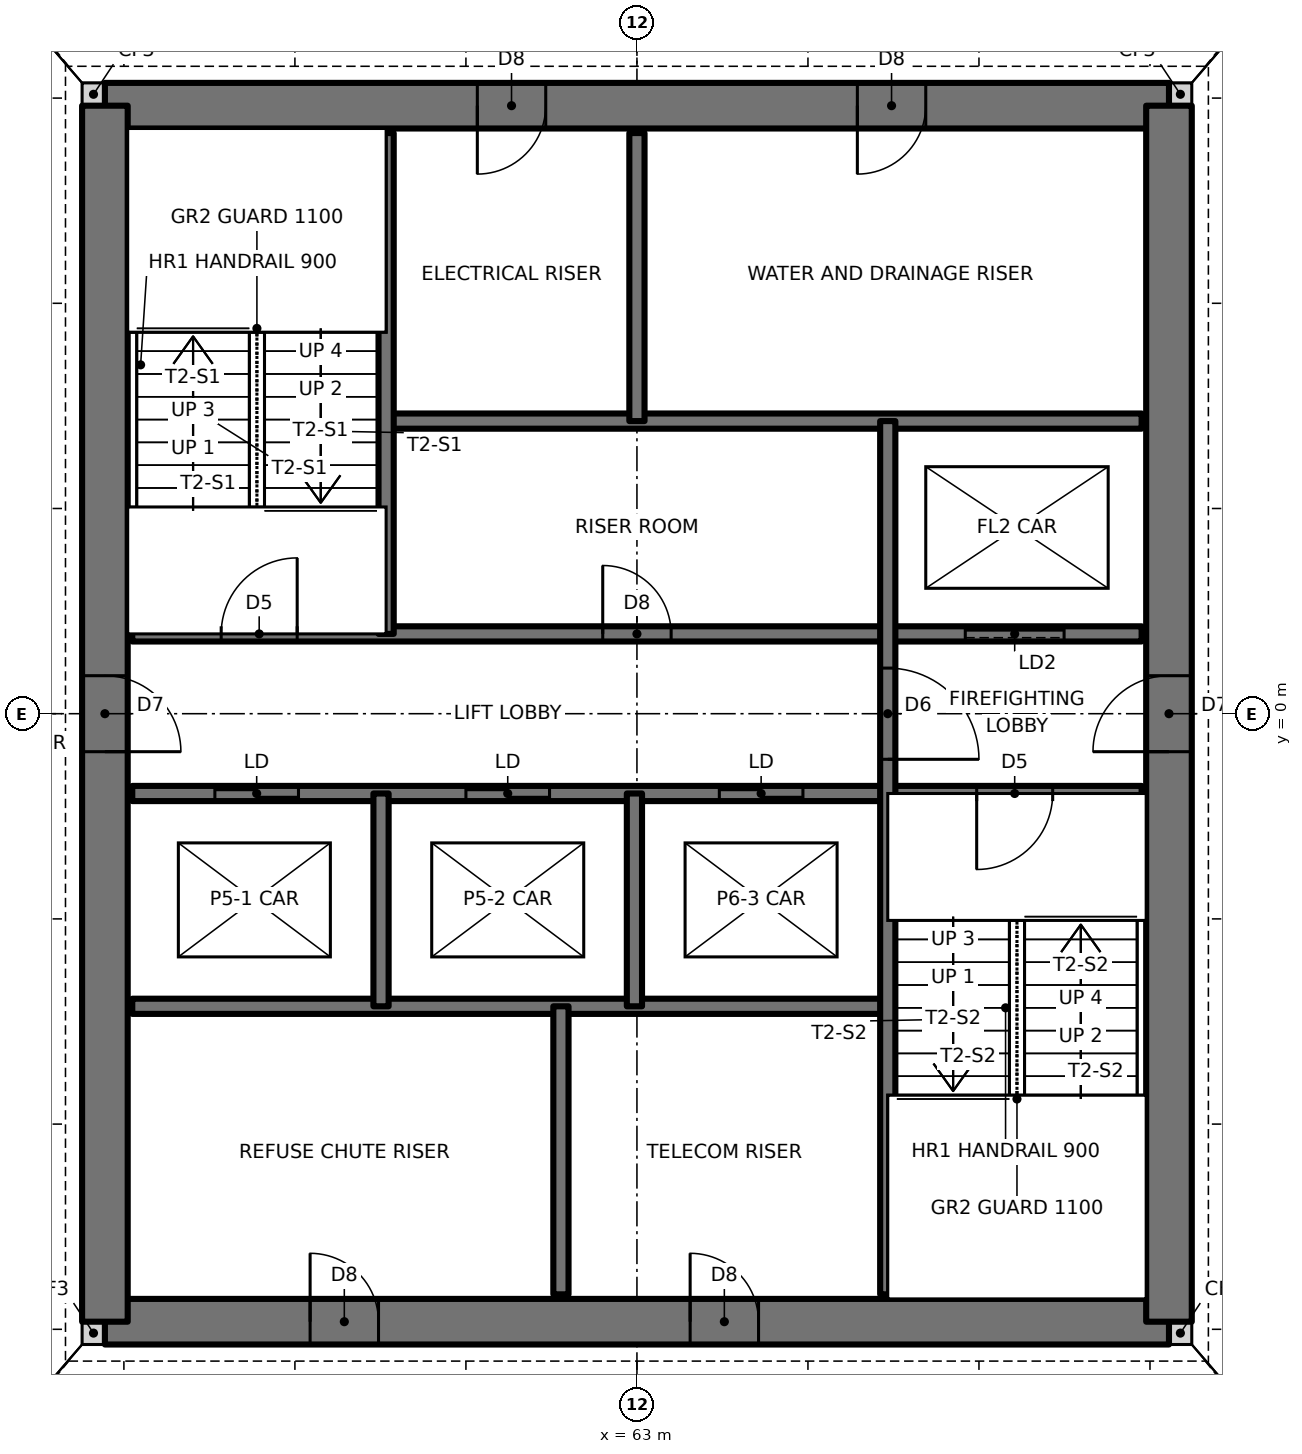
"""IFC4 building model, lengths in metres.
Left out: names, types, materials, properties, quantities, classifications, styles, units other than length and angle.
Written with IfcOpenShell. Run it as: python <this file> out.ifc"""

import sys

from ifc_helpers import new_model, si_unit, direction, frame, frame_2d, origin, place, context, subcontext, project, spatial, rectangle, extrude, element, fill, save


model = new_model("IFC4")
c1 = context("Model", 3, precision=1e-05, world=origin(), true_north=direction((0.0, 1.0)))
c2 = subcontext(c1, "Body", "Model", "MODEL_VIEW")
j1 = project(units=[si_unit("LENGTHUNIT", "METRE"), si_unit("PLANEANGLEUNIT", "RADIAN")], contexts=[c1])
p1 = place(None, origin())
s1 = spatial("IfcSite", under=j1, at=p1, CompositionType="ELEMENT")
p2 = place(p1, origin())
s2 = spatial("IfcBuilding", under=s1, at=p2, CompositionType="ELEMENT")
p3 = place(p2, frame((0.0, 0.0, 74.5)))
s3 = spatial("IfcBuildingStorey", under=s2, at=p3, CompositionType="ELEMENT", Elevation=74.5)
for number, where, z_axis, x_axis in (
    (1, (55.7, -8.15, 0.0), (0.0, 0.0, 1.0), (1.0, 0.0, 0.0)),
    (2, (70.0, -8.15, 0.0), (0.0, 0.0, 1.0), (1.0, 0.0, 0.0)),
    (3, (70.0, 8.15, 0.0), (0.0, 0.0, 1.0), (1.0, 0.0, 0.0)),
    (4, (55.7, 8.15, 0.0), (0.0, 0.0, 1.0), (1.0, 0.0, 0.0)),
):
    element("IfcWall", number, at=place(p3, frame(where, z_axis=z_axis, x_axis=x_axis)), inside=s3, PredefinedType="SOLIDWALL", context=c2, shape_type="SweptSolid", body=[
        extrude(rectangle(XDim=0.3, YDim=0.3, at=frame_2d((0.15, 0.0))), origin(), (0.0, 0.0, 1.0), 6.0),
    ])
p4 = place(p3, frame((56.0, -8.0, 0.0), z_axis=(0.0, 0.0, 1.0), x_axis=(1.0, 0.0, 0.0)))
e5 = element("IfcWall", 5, at=p4, inside=s3, PredefinedType="SHEAR", context=c2, shape_type="SweptSolid", body=[
    extrude(rectangle(XDim=14.0, YDim=0.6, at=frame_2d((7.0, 0.0))), origin(), (0.0, 0.0, 1.0), 6.0),
])
p5 = place(p4, frame((2.7, 0.0, 0.0)))
e6 = element("IfcOpeningElement", 6, at=p5, cuts=e5, PredefinedType="OPENING", context=c2, shape_type="SweptSolid", body=[
    extrude(rectangle(XDim=0.9, YDim=2.1, at=frame_2d((0.45, 1.05))), frame((0.0, 0.31, 0.0), z_axis=(0.0, -1.0, 0.0), x_axis=(1.0, 0.0, 0.0)), (0.0, 0.0, 1.0), 0.62),
])
p6 = place(p4, frame((7.7, 0.0, 0.0)))
e7 = element("IfcOpeningElement", 7, at=p6, cuts=e5, PredefinedType="OPENING", context=c2, shape_type="SweptSolid", body=[
    extrude(rectangle(XDim=0.9, YDim=2.1, at=frame_2d((0.45, 1.05))), frame((0.0, 0.31, 0.0), z_axis=(0.0, -1.0, 0.0), x_axis=(1.0, 0.0, 0.0)), (0.0, 0.0, 1.0), 0.62),
])
p7 = place(p3, frame((70.0, 8.0, 0.0), z_axis=(0.0, 0.0, 1.0), x_axis=(-1.0, 0.0, 0.0)))
e8 = element("IfcWall", 8, at=p7, inside=s3, PredefinedType="SHEAR", context=c2, shape_type="SweptSolid", body=[
    extrude(rectangle(XDim=14.0, YDim=0.6, at=frame_2d((7.0, 0.0))), origin(), (0.0, 0.0, 1.0), 6.0),
])
p8 = place(p7, frame((8.2, 0.0, 0.0)))
e9 = element("IfcOpeningElement", 9, at=p8, cuts=e8, PredefinedType="OPENING", context=c2, shape_type="SweptSolid", body=[
    extrude(rectangle(XDim=0.9, YDim=2.1, at=frame_2d((0.45, 1.05))), frame((0.0, 0.31, 0.0), z_axis=(0.0, -1.0, 0.0), x_axis=(1.0, 0.0, 0.0)), (0.0, 0.0, 1.0), 0.62),
])
p9 = place(p7, frame((3.2, 0.0, 0.0)))
e10 = element("IfcOpeningElement", 10, at=p9, cuts=e8, PredefinedType="OPENING", context=c2, shape_type="SweptSolid", body=[
    extrude(rectangle(XDim=0.9, YDim=2.1, at=frame_2d((0.45, 1.05))), frame((0.0, 0.31, 0.0), z_axis=(0.0, -1.0, 0.0), x_axis=(1.0, 0.0, 0.0)), (0.0, 0.0, 1.0), 0.62),
])
p10 = place(p3, frame((70.0, -8.0, 0.0), z_axis=(0.0, 0.0, 1.0), x_axis=(0.0, 1.0, 0.0)))
e11 = element("IfcWall", 11, at=p10, inside=s3, PredefinedType="SHEAR", context=c2, shape_type="SweptSolid", body=[
    extrude(rectangle(XDim=16.0, YDim=0.6, at=frame_2d((8.0, 0.0))), origin(), (0.0, 0.0, 1.0), 6.0),
])
p11 = place(p10, frame((7.5, 0.0, 0.0)))
e12 = element("IfcOpeningElement", 12, at=p11, cuts=e11, PredefinedType="OPENING", context=c2, shape_type="SweptSolid", body=[
    extrude(rectangle(XDim=1.0, YDim=2.1, at=frame_2d((0.5, 1.05))), frame((0.0, 0.31, 0.0), z_axis=(0.0, -1.0, 0.0), x_axis=(1.0, 0.0, 0.0)), (0.0, 0.0, 1.0), 0.62),
])
p12 = place(p3, frame((56.0, 8.0, 0.0), z_axis=(0.0, 0.0, 1.0), x_axis=(0.0, -1.0, 0.0)))
e13 = element("IfcWall", 13, at=p12, inside=s3, PredefinedType="SHEAR", context=c2, shape_type="SweptSolid", body=[
    extrude(rectangle(XDim=16.0, YDim=0.6, at=frame_2d((8.0, 0.0))), origin(), (0.0, 0.0, 1.0), 6.0),
])
p13 = place(p12, frame((7.5, 0.0, 0.0)))
e14 = element("IfcOpeningElement", 14, at=p13, cuts=e13, PredefinedType="OPENING", context=c2, shape_type="SweptSolid", body=[
    extrude(rectangle(XDim=1.0, YDim=2.1, at=frame_2d((0.5, 1.05))), frame((0.0, 0.31, 0.0), z_axis=(0.0, -1.0, 0.0), x_axis=(1.0, 0.0, 0.0)), (0.0, 0.0, 1.0), 0.62),
])
p14 = place(p3, frame((56.36, -3.85, 0.0), z_axis=(0.0, 0.0, 1.0), x_axis=(1.0, 0.0, 0.0)))
e15 = element("IfcWall", 15, at=p14, inside=s3, PredefinedType="SOLIDWALL", context=c2, shape_type="SweptSolid", body=[
    extrude(rectangle(XDim=9.94, YDim=0.2, at=frame_2d((4.97, 0.0))), origin(), (0.0, 0.0, 1.0), 6.0),
])
p15 = place(p3, frame((56.36, -1.05, 0.0), z_axis=(0.0, 0.0, 1.0), x_axis=(1.0, 0.0, 0.0)))
e16 = element("IfcWall", 16, at=p15, inside=s3, PredefinedType="SOLIDWALL", context=c2, shape_type="SweptSolid", body=[
    extrude(rectangle(XDim=13.28, YDim=0.2, at=frame_2d((6.64, 0.0))), origin(), (0.0, 0.0, 1.0), 6.0),
])
p16 = place(p15, frame((11.11, 0.0, 0.0)))
e17 = element("IfcOpeningElement", 17, at=p16, cuts=e16, PredefinedType="OPENING", context=c2, shape_type="SweptSolid", body=[
    extrude(rectangle(XDim=1.0, YDim=2.1, at=frame_2d((0.5, 1.05))), frame((0.0, 0.11, 0.0), z_axis=(0.0, -1.0, 0.0), x_axis=(1.0, 0.0, 0.0)), (0.0, 0.0, 1.0), 0.22),
])
p17 = place(p15, frame((1.087, 0.0, 0.0)))
e18 = element("IfcOpeningElement", 18, at=p17, cuts=e16, PredefinedType="OPENING", context=c2, shape_type="SweptSolid", body=[
    extrude(rectangle(XDim=1.1, YDim=2.1, at=frame_2d((0.55, 1.05))), frame((0.0, 0.11, 0.0), z_axis=(0.0, -1.0, 0.0), x_axis=(1.0, 0.0, 0.0)), (0.0, 0.0, 1.0), 0.22),
])
p18 = place(p15, frame((4.39, 0.0, 0.0)))
e19 = element("IfcOpeningElement", 19, at=p18, cuts=e16, PredefinedType="OPENING", context=c2, shape_type="SweptSolid", body=[
    extrude(rectangle(XDim=1.1, YDim=2.1, at=frame_2d((0.55, 1.05))), frame((0.0, 0.11, 0.0), z_axis=(0.0, -1.0, 0.0), x_axis=(1.0, 0.0, 0.0)), (0.0, 0.0, 1.0), 0.22),
])
p19 = place(p15, frame((7.724, 0.0, 0.0)))
e20 = element("IfcOpeningElement", 20, at=p19, cuts=e16, PredefinedType="OPENING", context=c2, shape_type="SweptSolid", body=[
    extrude(rectangle(XDim=1.1, YDim=2.1, at=frame_2d((0.55, 1.05))), frame((0.0, 0.11, 0.0), z_axis=(0.0, -1.0, 0.0), x_axis=(1.0, 0.0, 0.0)), (0.0, 0.0, 1.0), 0.22),
])
p20 = place(p3, frame((56.36, 1.05, 0.0), z_axis=(0.0, 0.0, 1.0), x_axis=(1.0, 0.0, 0.0)))
e21 = element("IfcWall", 21, at=p20, inside=s3, PredefinedType="SOLIDWALL", context=c2, shape_type="SweptSolid", body=[
    extrude(rectangle(XDim=13.28, YDim=0.2, at=frame_2d((6.64, 0.0))), origin(), (0.0, 0.0, 1.0), 6.0),
])
p21 = place(p20, frame((1.17, 0.0, 0.0)))
e22 = element("IfcOpeningElement", 22, at=p21, cuts=e21, PredefinedType="OPENING", context=c2, shape_type="SweptSolid", body=[
    extrude(rectangle(XDim=1.0, YDim=2.1, at=frame_2d((0.5, 1.05))), frame((0.0, 0.11, 0.0), z_axis=(0.0, -1.0, 0.0), x_axis=(1.0, 0.0, 0.0)), (0.0, 0.0, 1.0), 0.22),
])
p22 = place(p20, frame((6.19, 0.0, 0.0)))
e23 = element("IfcOpeningElement", 23, at=p22, cuts=e21, PredefinedType="OPENING", context=c2, shape_type="SweptSolid", body=[
    extrude(rectangle(XDim=0.9, YDim=2.1, at=frame_2d((0.45, 1.05))), frame((0.0, 0.11, 0.0), z_axis=(0.0, -1.0, 0.0), x_axis=(1.0, 0.0, 0.0)), (0.0, 0.0, 1.0), 0.22),
])
p23 = place(p20, frame((10.96, 0.0, 0.0)))
e24 = element("IfcOpeningElement", 24, at=p23, cuts=e21, PredefinedType="OPENING", context=c2, shape_type="SweptSolid", body=[
    extrude(rectangle(XDim=1.3, YDim=2.1, at=frame_2d((0.65, 1.05))), frame((0.0, 0.11, 0.0), z_axis=(0.0, -1.0, 0.0), x_axis=(1.0, 0.0, 0.0)), (0.0, 0.0, 1.0), 0.22),
])
p24 = place(p3, frame((59.7, 3.85, 0.0), z_axis=(0.0, 0.0, 1.0), x_axis=(1.0, 0.0, 0.0)))
e25 = element("IfcWall", 25, at=p24, inside=s3, PredefinedType="SOLIDWALL", context=c2, shape_type="SweptSolid", body=[
    extrude(rectangle(XDim=9.94, YDim=0.2, at=frame_2d((4.97, 0.0))), origin(), (0.0, 0.0, 1.0), 6.0),
])
p25 = place(p3, frame((66.3, -7.64, 0.0), z_axis=(0.0, 0.0, 1.0), x_axis=(0.0, 1.0, 0.0)))
e26 = element("IfcWall", 26, at=p25, inside=s3, PredefinedType="SOLIDWALL", context=c2, shape_type="SweptSolid", body=[
    extrude(rectangle(XDim=11.49, YDim=0.2, at=frame_2d((5.745, 0.0))), origin(), (0.0, 0.0, 1.0), 6.0),
])
p26 = place(p25, frame((7.04, 0.0, 0.0)))
e27 = element("IfcOpeningElement", 27, at=p26, cuts=e26, PredefinedType="OPENING", context=c2, shape_type="SweptSolid", body=[
    extrude(rectangle(XDim=1.2, YDim=2.1, at=frame_2d((0.6, 1.05))), frame((0.0, 0.11, 0.0), z_axis=(0.0, -1.0, 0.0), x_axis=(1.0, 0.0, 0.0)), (0.0, 0.0, 1.0), 0.22),
])
p27 = place(p3, frame((63.0, 3.85, 0.0), z_axis=(0.0, 0.0, 1.0), x_axis=(0.0, 1.0, 0.0)))
e28 = element("IfcWall", 28, at=p27, inside=s3, PredefinedType="SOLIDWALL", context=c2, shape_type="SweptSolid", body=[
    extrude(rectangle(XDim=3.79, YDim=0.2, at=frame_2d((1.895, 0.0))), origin(), (0.0, 0.0, 1.0), 6.0),
])
p28 = place(p3, frame((62.967, -3.85, 0.0), z_axis=(0.0, 0.0, 1.0), x_axis=(0.0, 1.0, 0.0)))
e29 = element("IfcWall", 29, at=p28, inside=s3, PredefinedType="SOLIDWALL", context=c2, shape_type="SweptSolid", body=[
    extrude(rectangle(XDim=2.8, YDim=0.2, at=frame_2d((1.4, 0.0))), origin(), (0.0, 0.0, 1.0), 6.0),
])
p29 = place(p3, frame((62.0, -7.64, 0.0), z_axis=(0.0, 0.0, 1.0), x_axis=(0.0, 1.0, 0.0)))
e30 = element("IfcWall", 30, at=p29, inside=s3, PredefinedType="SOLIDWALL", context=c2, shape_type="SweptSolid", body=[
    extrude(rectangle(XDim=3.79, YDim=0.2, at=frame_2d((1.895, 0.0))), origin(), (0.0, 0.0, 1.0), 6.0),
])
p30 = place(p3, frame((59.7, 1.05, 0.0), z_axis=(0.0, 0.0, 1.0), x_axis=(0.0, 1.0, 0.0)))
e31 = element("IfcWall", 31, at=p30, inside=s3, PredefinedType="SOLIDWALL", context=c2, shape_type="SweptSolid", body=[
    extrude(rectangle(XDim=6.59, YDim=0.2, at=frame_2d((3.295, 0.0))), origin(), (0.0, 0.0, 1.0), 6.0),
])
p31 = place(p3, frame((59.633, -3.85, 0.0), z_axis=(0.0, 0.0, 1.0), x_axis=(0.0, 1.0, 0.0)))
e32 = element("IfcWall", 32, at=p31, inside=s3, PredefinedType="SOLIDWALL", context=c2, shape_type="SweptSolid", body=[
    extrude(rectangle(XDim=2.8, YDim=0.2, at=frame_2d((1.4, 0.0))), origin(), (0.0, 0.0, 1.0), 6.0),
])
p32 = place(p21, origin())
e33 = element("IfcDoor", 33, at=p32, inside=s3, OperationType="SINGLE_SWING_RIGHT", PredefinedType="DOOR", context=c2, shape_type="SweptSolid", body=[
    extrude(rectangle(XDim=1.0, YDim=2.1, at=frame_2d((0.5, 1.05))), frame((0.0, 0.025, 0.0), z_axis=(0.0, -1.0, 0.0), x_axis=(1.0, 0.0, 0.0)), (0.0, 0.0, 1.0), 0.05),
])
fill(e22, e33)
p33 = place(p16, frame((1.0, 0.0, 0.0), z_axis=(0.0, 0.0, 1.0), x_axis=(-1.0, 0.0, 0.0)))
e34 = element("IfcDoor", 34, at=p33, inside=s3, OperationType="SINGLE_SWING_RIGHT", PredefinedType="DOOR", context=c2, shape_type="SweptSolid", body=[
    extrude(rectangle(XDim=1.0, YDim=2.1, at=frame_2d((0.5, 1.05))), frame((0.0, 0.025, 0.0), z_axis=(0.0, -1.0, 0.0), x_axis=(1.0, 0.0, 0.0)), (0.0, 0.0, 1.0), 0.05),
])
fill(e17, e34)
p34 = place(p26, frame((1.2, 0.0, 0.0), z_axis=(0.0, 0.0, 1.0), x_axis=(-1.0, 0.0, 0.0)))
e35 = element("IfcDoor", 35, at=p34, inside=s3, OperationType="SINGLE_SWING_RIGHT", PredefinedType="DOOR", context=c2, shape_type="SweptSolid", body=[
    extrude(rectangle(XDim=1.2, YDim=2.1, at=frame_2d((0.6, 1.05))), frame((0.0, 0.025, 0.0), z_axis=(0.0, -1.0, 0.0), x_axis=(1.0, 0.0, 0.0)), (0.0, 0.0, 1.0), 0.05),
])
fill(e27, e35)
p35 = place(p22, origin())
e36 = element("IfcDoor", 36, at=p35, inside=s3, OperationType="SINGLE_SWING_LEFT", PredefinedType="DOOR", context=c2, shape_type="SweptSolid", body=[
    extrude(rectangle(XDim=0.9, YDim=2.1, at=frame_2d((0.45, 1.05))), frame((0.0, 0.025, 0.0), z_axis=(0.0, -1.0, 0.0), x_axis=(1.0, 0.0, 0.0)), (0.0, 0.0, 1.0), 0.05),
])
fill(e23, e36)
p36 = place(p13, origin())
e37 = element("IfcDoor", 37, at=p36, inside=s3, OperationType="SINGLE_SWING_RIGHT", PredefinedType="DOOR", context=c2, shape_type="SweptSolid", body=[
    extrude(rectangle(XDim=1.0, YDim=2.1, at=frame_2d((0.5, 1.05))), frame((0.0, 0.025, 0.0), z_axis=(0.0, -1.0, 0.0), x_axis=(1.0, 0.0, 0.0)), (0.0, 0.0, 1.0), 0.05),
])
fill(e14, e37)
p37 = place(p11, origin())
e38 = element("IfcDoor", 38, at=p37, inside=s3, OperationType="SINGLE_SWING_LEFT", PredefinedType="DOOR", context=c2, shape_type="SweptSolid", body=[
    extrude(rectangle(XDim=1.0, YDim=2.1, at=frame_2d((0.5, 1.05))), frame((0.0, 0.025, 0.0), z_axis=(0.0, -1.0, 0.0), x_axis=(1.0, 0.0, 0.0)), (0.0, 0.0, 1.0), 0.05),
])
fill(e12, e38)
p38 = place(p8, origin())
e39 = element("IfcDoor", 39, at=p38, inside=s3, OperationType="SINGLE_SWING_RIGHT", PredefinedType="DOOR", context=c2, shape_type="SweptSolid", body=[
    extrude(rectangle(XDim=0.9, YDim=2.1, at=frame_2d((0.45, 1.05))), frame((0.0, 0.025, 0.0), z_axis=(0.0, -1.0, 0.0), x_axis=(1.0, 0.0, 0.0)), (0.0, 0.0, 1.0), 0.05),
])
fill(e9, e39)
p39 = place(p9, origin())
e40 = element("IfcDoor", 40, at=p39, inside=s3, OperationType="SINGLE_SWING_RIGHT", PredefinedType="DOOR", context=c2, shape_type="SweptSolid", body=[
    extrude(rectangle(XDim=0.9, YDim=2.1, at=frame_2d((0.45, 1.05))), frame((0.0, 0.025, 0.0), z_axis=(0.0, -1.0, 0.0), x_axis=(1.0, 0.0, 0.0)), (0.0, 0.0, 1.0), 0.05),
])
fill(e10, e40)
p40 = place(p5, origin())
e41 = element("IfcDoor", 41, at=p40, inside=s3, OperationType="SINGLE_SWING_LEFT", PredefinedType="DOOR", context=c2, shape_type="SweptSolid", body=[
    extrude(rectangle(XDim=0.9, YDim=2.1, at=frame_2d((0.45, 1.05))), frame((0.0, 0.025, 0.0), z_axis=(0.0, -1.0, 0.0), x_axis=(1.0, 0.0, 0.0)), (0.0, 0.0, 1.0), 0.05),
])
fill(e6, e41)
p41 = place(p6, origin())
e42 = element("IfcDoor", 42, at=p41, inside=s3, OperationType="SINGLE_SWING_LEFT", PredefinedType="DOOR", context=c2, shape_type="SweptSolid", body=[
    extrude(rectangle(XDim=0.9, YDim=2.1, at=frame_2d((0.45, 1.05))), frame((0.0, 0.025, 0.0), z_axis=(0.0, -1.0, 0.0), x_axis=(1.0, 0.0, 0.0)), (0.0, 0.0, 1.0), 0.05),
])
fill(e7, e42)
p42 = place(p17, origin())
e43 = element("IfcDoor", 43, at=p42, inside=s3, OperationType="DOUBLE_DOOR_SLIDING", PredefinedType="DOOR", context=c2, shape_type="SweptSolid", body=[
    extrude(rectangle(XDim=1.1, YDim=2.1, at=frame_2d((0.55, 1.05))), frame((0.0, 0.025, 0.0), z_axis=(0.0, -1.0, 0.0), x_axis=(1.0, 0.0, 0.0)), (0.0, 0.0, 1.0), 0.05),
])
fill(e18, e43)
p43 = place(p18, origin())
e44 = element("IfcDoor", 44, at=p43, inside=s3, OperationType="DOUBLE_DOOR_SLIDING", PredefinedType="DOOR", context=c2, shape_type="SweptSolid", body=[
    extrude(rectangle(XDim=1.1, YDim=2.1, at=frame_2d((0.55, 1.05))), frame((0.0, 0.025, 0.0), z_axis=(0.0, -1.0, 0.0), x_axis=(1.0, 0.0, 0.0)), (0.0, 0.0, 1.0), 0.05),
])
fill(e19, e44)
p44 = place(p19, origin())
e45 = element("IfcDoor", 45, at=p44, inside=s3, OperationType="DOUBLE_DOOR_SLIDING", PredefinedType="DOOR", context=c2, shape_type="SweptSolid", body=[
    extrude(rectangle(XDim=1.1, YDim=2.1, at=frame_2d((0.55, 1.05))), frame((0.0, 0.025, 0.0), z_axis=(0.0, -1.0, 0.0), x_axis=(1.0, 0.0, 0.0)), (0.0, 0.0, 1.0), 0.05),
])
fill(e20, e45)
p45 = place(p23, origin())
e46 = element("IfcDoor", 46, at=p45, inside=s3, OperationType="SLIDING_TO_LEFT", PredefinedType="DOOR", context=c2, shape_type="SweptSolid", body=[
    extrude(rectangle(XDim=1.3, YDim=2.1, at=frame_2d((0.65, 1.05))), frame((0.0, 0.025, 0.0), z_axis=(0.0, -1.0, 0.0), x_axis=(1.0, 0.0, 0.0)), (0.0, 0.0, 1.0), 0.05),
])
fill(e24, e46)
save(model, sys.argv[1])
